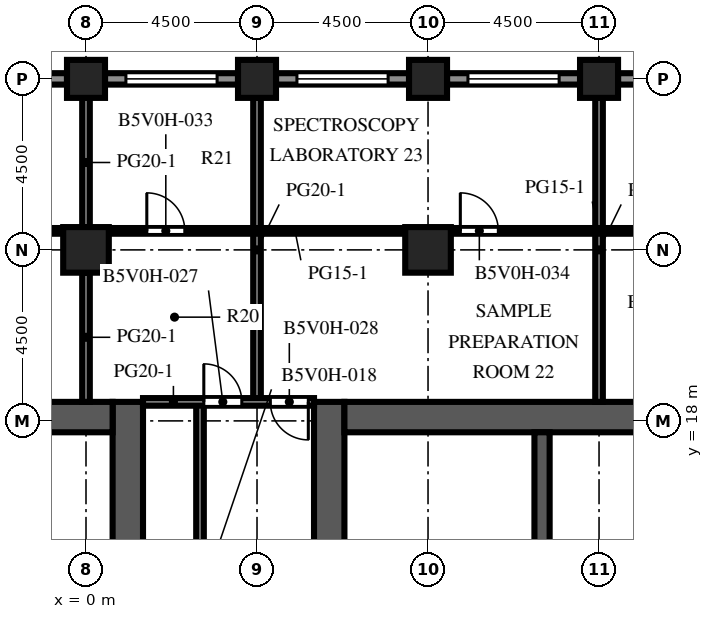
"""IFC4 building model, lengths in metres.
Left out: names, types, materials, properties, quantities, classifications, styles, units other than length and angle.
Written with IfcOpenShell. Run it as: python <this file> out.ifc"""

import sys

from ifc_helpers import new_model, si_unit, direction, frame, frame_2d, origin, origin_2d, place, context, subcontext, project, spatial, rectangle, extrude, element, fill, save


model = new_model("IFC4")
c1 = context("Model", 3, precision=1e-05, world=origin(), true_north=direction((0.0, 1.0)))
c2 = subcontext(c1, "Body", "Model", "MODEL_VIEW")
j1 = project(units=[si_unit("LENGTHUNIT", "METRE"), si_unit("PLANEANGLEUNIT", "RADIAN")], contexts=[c1])
p1 = place(None, origin())
s1 = spatial("IfcSite", under=j1, at=p1, CompositionType="ELEMENT")
p2 = place(p1, origin())
s2 = spatial("IfcBuilding", under=s1, at=p2, CompositionType="ELEMENT")
p3 = place(p2, frame((0.0, 0.0, 156.8)))
s3 = spatial("IfcBuildingStorey", under=s2, at=p3, CompositionType="ELEMENT", Elevation=156.8)
for number, where, z_axis, x_axis in (
    (1, (0.0, 27.0, 0.0), (0.0, 0.0, 1.0), (1.0, 0.0, 0.0)),
    (2, (4.5, 27.0, 0.0), (0.0, 0.0, 1.0), (1.0, 0.0, 0.0)),
    (3, (9.0, 27.0, 0.0), (0.0, 0.0, 1.0), (1.0, 0.0, 0.0)),
    (4, (13.5, 27.0, 0.0), (0.0, 0.0, 1.0), (1.0, 0.0, 0.0)),
):
    element("IfcColumn", number, at=place(p3, frame(where, z_axis=z_axis, x_axis=x_axis)), inside=s3, PredefinedType="COLUMN", context=c2, shape_type="SweptSolid", body=[
        extrude(rectangle(XDim=1.0, YDim=1.0, at=origin_2d()), origin(), (0.0, 0.0, 1.0), 4.1),
    ])
for number, where, z_axis, x_axis in (
    (5, (0.0, 22.5, 0.0), (0.0, 0.0, 1.0), (1.0, 0.0, 0.0)),
    (6, (9.0, 22.5, 0.0), (0.0, 0.0, 1.0), (1.0, 0.0, 0.0)),
):
    element("IfcColumn", number, at=place(p3, frame(where, z_axis=z_axis, x_axis=x_axis)), inside=s3, PredefinedType="COLUMN", context=c2, shape_type="SweptSolid", body=[
        extrude(rectangle(XDim=1.2, YDim=1.2, at=origin_2d()), origin(), (0.0, 0.0, 1.0), 4.1),
    ])
p4 = place(p3, frame((1.1, -9.0, 0.0), z_axis=(0.0, 0.0, 1.0), x_axis=(0.0, 1.0, 0.0)))
e7 = element("IfcWall", 7, at=p4, inside=s3, PredefinedType="SHEAR", context=c2, shape_type="SweptSolid", body=[
    extrude(rectangle(XDim=27.5, YDim=0.8, at=frame_2d((13.75, 0.0))), origin(), (0.0, 0.0, 1.0), 4.1),
])
p5 = place(p4, frame((12.55, 0.0, 0.0)))
e8 = element("IfcOpeningElement", 8, at=p5, cuts=e7, PredefinedType="OPENING", context=c2, shape_type="SweptSolid", body=[
    extrude(rectangle(XDim=2.4, YDim=2.4, at=frame_2d((1.2, 1.2))), frame((0.0, 0.41, 0.0), z_axis=(0.0, -1.0, 0.0), x_axis=(1.0, 0.0, 0.0)), (0.0, 0.0, 1.0), 0.82),
])
p6 = place(p4, frame((5.45, 0.0, 0.0)))
e9 = element("IfcOpeningElement", 9, at=p6, cuts=e7, PredefinedType="OPENING", context=c2, shape_type="SweptSolid", body=[
    extrude(rectangle(XDim=1.2, YDim=2.1, at=frame_2d((0.6, 1.05))), frame((0.0, 0.41, 0.0), z_axis=(0.0, -1.0, 0.0), x_axis=(1.0, 0.0, 0.0)), (0.0, 0.0, 1.0), 0.82),
])
p7 = place(p4, frame((19.45, 0.0, 0.0)))
e10 = element("IfcOpeningElement", 10, at=p7, cuts=e7, PredefinedType="OPENING", context=c2, shape_type="SweptSolid", body=[
    extrude(rectangle(XDim=1.0, YDim=2.1, at=frame_2d((0.5, 1.05))), frame((0.0, 0.41, 0.0), z_axis=(0.0, -1.0, 0.0), x_axis=(1.0, 0.0, 0.0)), (0.0, 0.0, 1.0), 0.82),
])
p8 = place(p4, frame((21.137, 0.0, 0.0)))
e11 = element("IfcOpeningElement", 11, at=p8, cuts=e7, PredefinedType="OPENING", context=c2, shape_type="SweptSolid", body=[
    extrude(rectangle(XDim=1.0, YDim=2.1, at=frame_2d((0.5, 1.05))), frame((0.0, 0.41, 0.0), z_axis=(0.0, -1.0, 0.0), x_axis=(1.0, 0.0, 0.0)), (0.0, 0.0, 1.0), 0.82),
])
p9 = place(p4, frame((23.2, 0.0, 0.0)))
e12 = element("IfcOpeningElement", 12, at=p9, cuts=e7, PredefinedType="OPENING", context=c2, shape_type="SweptSolid", body=[
    extrude(rectangle(XDim=1.0, YDim=2.1, at=frame_2d((0.5, 1.05))), frame((0.0, 0.41, 0.0), z_axis=(0.0, -1.0, 0.0), x_axis=(1.0, 0.0, 0.0)), (0.0, 0.0, 1.0), 0.82),
])
p10 = place(p4, frame((25.262, 0.0, 0.0)))
e13 = element("IfcOpeningElement", 13, at=p10, cuts=e7, PredefinedType="OPENING", context=c2, shape_type="SweptSolid", body=[
    extrude(rectangle(XDim=1.0, YDim=2.1, at=frame_2d((0.5, 1.05))), frame((0.0, 0.41, 0.0), z_axis=(0.0, -1.0, 0.0), x_axis=(1.0, 0.0, 0.0)), (0.0, 0.0, 1.0), 0.82),
])
p11 = place(p3, frame((-9.7, 18.1, 0.0), z_axis=(0.0, 0.0, 1.0), x_axis=(1.0, 0.0, 0.0)))
e14 = element("IfcWall", 14, at=p11, inside=s3, PredefinedType="SHEAR", context=c2, shape_type="SweptSolid", body=[
    extrude(rectangle(XDim=10.4, YDim=0.8, at=frame_2d((5.2, 0.0))), origin(), (0.0, 0.0, 1.0), 4.1),
])
p12 = place(p3, frame((6.4, -9.0, 0.0), z_axis=(0.0, 0.0, 1.0), x_axis=(0.0, 1.0, 0.0)))
e15 = element("IfcWall", 15, at=p12, inside=s3, PredefinedType="SHEAR", context=c2, shape_type="SweptSolid", body=[
    extrude(rectangle(XDim=27.5, YDim=0.8, at=frame_2d((13.75, 0.0))), origin(), (0.0, 0.0, 1.0), 4.1),
])
p13 = place(p12, frame((12.55, 0.0, 0.0)))
e16 = element("IfcOpeningElement", 16, at=p13, cuts=e15, PredefinedType="OPENING", context=c2, shape_type="SweptSolid", body=[
    extrude(rectangle(XDim=2.4, YDim=2.4, at=frame_2d((1.2, 1.2))), frame((0.0, 0.41, 0.0), z_axis=(0.0, -1.0, 0.0), x_axis=(1.0, 0.0, 0.0)), (0.0, 0.0, 1.0), 0.82),
])
p14 = place(p12, frame((5.45, 0.0, 0.0)))
e17 = element("IfcOpeningElement", 17, at=p14, cuts=e15, PredefinedType="OPENING", context=c2, shape_type="SweptSolid", body=[
    extrude(rectangle(XDim=1.2, YDim=2.1, at=frame_2d((0.6, 1.05))), frame((0.0, 0.41, 0.0), z_axis=(0.0, -1.0, 0.0), x_axis=(1.0, 0.0, 0.0)), (0.0, 0.0, 1.0), 0.82),
])
p15 = place(p12, frame((19.45, 0.0, 0.0)))
e18 = element("IfcOpeningElement", 18, at=p15, cuts=e15, PredefinedType="OPENING", context=c2, shape_type="SweptSolid", body=[
    extrude(rectangle(XDim=1.0, YDim=2.1, at=frame_2d((0.5, 1.05))), frame((0.0, 0.41, 0.0), z_axis=(0.0, -1.0, 0.0), x_axis=(1.0, 0.0, 0.0)), (0.0, 0.0, 1.0), 0.82),
])
p16 = place(p12, frame((21.137, 0.0, 0.0)))
e19 = element("IfcOpeningElement", 19, at=p16, cuts=e15, PredefinedType="OPENING", context=c2, shape_type="SweptSolid", body=[
    extrude(rectangle(XDim=1.0, YDim=2.1, at=frame_2d((0.5, 1.05))), frame((0.0, 0.41, 0.0), z_axis=(0.0, -1.0, 0.0), x_axis=(1.0, 0.0, 0.0)), (0.0, 0.0, 1.0), 0.82),
])
p17 = place(p12, frame((23.2, 0.0, 0.0)))
e20 = element("IfcOpeningElement", 20, at=p17, cuts=e15, PredefinedType="OPENING", context=c2, shape_type="SweptSolid", body=[
    extrude(rectangle(XDim=1.0, YDim=2.1, at=frame_2d((0.5, 1.05))), frame((0.0, 0.41, 0.0), z_axis=(0.0, -1.0, 0.0), x_axis=(1.0, 0.0, 0.0)), (0.0, 0.0, 1.0), 0.82),
])
p18 = place(p12, frame((25.262, 0.0, 0.0)))
e21 = element("IfcOpeningElement", 21, at=p18, cuts=e15, PredefinedType="OPENING", context=c2, shape_type="SweptSolid", body=[
    extrude(rectangle(XDim=1.0, YDim=2.1, at=frame_2d((0.5, 1.05))), frame((0.0, 0.41, 0.0), z_axis=(0.0, -1.0, 0.0), x_axis=(1.0, 0.0, 0.0)), (0.0, 0.0, 1.0), 0.82),
])
p19 = place(p3, frame((6.8, 18.1, 0.0), z_axis=(0.0, 0.0, 1.0), x_axis=(1.0, 0.0, 0.0)))
e22 = element("IfcWall", 22, at=p19, inside=s3, PredefinedType="SHEAR", context=c2, shape_type="SweptSolid", body=[
    extrude(rectangle(XDim=10.4, YDim=0.8, at=frame_2d((5.2, 0.0))), origin(), (0.0, 0.0, 1.0), 4.1),
])
p20 = place(p3, frame((12.0, 10.2, 0.0), z_axis=(0.0, 0.0, 1.0), x_axis=(0.0, 1.0, 0.0)))
e23 = element("IfcWall", 23, at=p20, inside=s3, PredefinedType="SHEAR", context=c2, shape_type="SweptSolid", body=[
    extrude(rectangle(XDim=7.5, YDim=0.4, at=frame_2d((3.75, 0.0))), origin(), (0.0, 0.0, 1.0), 4.1),
])
p21 = place(p3, frame((14.0, 27.0, 0.0), z_axis=(0.0, 0.0, 1.0), x_axis=(1.0, 0.0, 0.0)))
e24 = element("IfcWall", 24, at=p21, inside=s3, PredefinedType="SOLIDWALL", context=c2, shape_type="SweptSolid", body=[
    extrude(rectangle(XDim=3.5, YDim=0.3, at=frame_2d((1.75, 0.0))), origin(), (0.0, 0.0, 1.0), 2.85),
])
p22 = place(p21, frame((1.25, 0.0, 0.0)))
e25 = element("IfcOpeningElement", 25, at=p22, cuts=e24, PredefinedType="OPENING", context=c2, shape_type="SweptSolid", body=[
    extrude(rectangle(XDim=1.0, YDim=2.2, at=frame_2d((0.5, 1.1))), frame((0.0, 0.16, 0.0), z_axis=(0.0, -1.0, 0.0), x_axis=(1.0, 0.0, 0.0)), (0.0, 0.0, 1.0), 0.32),
])
p23 = place(p3, frame((9.5, 27.0, 0.0), z_axis=(0.0, 0.0, 1.0), x_axis=(1.0, 0.0, 0.0)))
e26 = element("IfcWall", 26, at=p23, inside=s3, PredefinedType="SOLIDWALL", context=c2, shape_type="SweptSolid", body=[
    extrude(rectangle(XDim=3.5, YDim=0.3, at=frame_2d((1.75, 0.0))), origin(), (0.0, 0.0, 1.0), 2.85),
])
p24 = place(p23, frame((0.55, 0.0, 0.8)))
e27 = element("IfcOpeningElement", 27, at=p24, cuts=e26, PredefinedType="OPENING", context=c2, shape_type="SweptSolid", body=[
    extrude(rectangle(XDim=2.4, YDim=1.7, at=frame_2d((1.2, 0.85))), frame((0.0, 0.16, 0.0), z_axis=(0.0, -1.0, 0.0), x_axis=(1.0, 0.0, 0.0)), (0.0, 0.0, 1.0), 0.32),
])
p25 = place(p3, frame((5.0, 27.0, 0.0), z_axis=(0.0, 0.0, 1.0), x_axis=(1.0, 0.0, 0.0)))
e28 = element("IfcWall", 28, at=p25, inside=s3, PredefinedType="SOLIDWALL", context=c2, shape_type="SweptSolid", body=[
    extrude(rectangle(XDim=3.5, YDim=0.3, at=frame_2d((1.75, 0.0))), origin(), (0.0, 0.0, 1.0), 2.85),
])
p26 = place(p25, frame((0.55, 0.0, 0.8)))
e29 = element("IfcOpeningElement", 29, at=p26, cuts=e28, PredefinedType="OPENING", context=c2, shape_type="SweptSolid", body=[
    extrude(rectangle(XDim=2.4, YDim=1.7, at=frame_2d((1.2, 0.85))), frame((0.0, 0.16, 0.0), z_axis=(0.0, -1.0, 0.0), x_axis=(1.0, 0.0, 0.0)), (0.0, 0.0, 1.0), 0.32),
])
p27 = place(p3, frame((0.5, 27.0, 0.0), z_axis=(0.0, 0.0, 1.0), x_axis=(1.0, 0.0, 0.0)))
e30 = element("IfcWall", 30, at=p27, inside=s3, PredefinedType="SOLIDWALL", context=c2, shape_type="SweptSolid", body=[
    extrude(rectangle(XDim=3.5, YDim=0.3, at=frame_2d((1.75, 0.0))), origin(), (0.0, 0.0, 1.0), 2.85),
])
p28 = place(p27, frame((0.55, 0.0, 0.8)))
e31 = element("IfcOpeningElement", 31, at=p28, cuts=e30, PredefinedType="OPENING", context=c2, shape_type="SweptSolid", body=[
    extrude(rectangle(XDim=2.4, YDim=1.7, at=frame_2d((1.2, 0.85))), frame((0.0, 0.16, 0.0), z_axis=(0.0, -1.0, 0.0), x_axis=(1.0, 0.0, 0.0)), (0.0, 0.0, 1.0), 0.32),
])
p29 = place(p3, frame((-4.0, 27.0, 0.0), z_axis=(0.0, 0.0, 1.0), x_axis=(1.0, 0.0, 0.0)))
e32 = element("IfcWall", 32, at=p29, inside=s3, PredefinedType="SOLIDWALL", context=c2, shape_type="SweptSolid", body=[
    extrude(rectangle(XDim=3.5, YDim=0.3, at=frame_2d((1.75, 0.0))), origin(), (0.0, 0.0, 1.0), 2.85),
])
p30 = place(p29, frame((0.55, 0.0, 0.8)))
e33 = element("IfcOpeningElement", 33, at=p30, cuts=e32, PredefinedType="OPENING", context=c2, shape_type="SweptSolid", body=[
    extrude(rectangle(XDim=2.4, YDim=1.7, at=frame_2d((1.2, 0.85))), frame((0.0, 0.16, 0.0), z_axis=(0.0, -1.0, 0.0), x_axis=(1.0, 0.0, 0.0)), (0.0, 0.0, 1.0), 0.32),
])
for number, where, z_axis, x_axis in (
    (34, (-4.3, 15.825, 0.0), (0.0, 0.0, 1.0), (1.0, 0.0, 0.0)),
    (35, (6.8, 15.825, 0.0), (0.0, 0.0, 1.0), (1.0, 0.0, 0.0)),
):
    element("IfcWall", number, at=place(p3, frame(where, z_axis=z_axis, x_axis=x_axis)), inside=s3, PredefinedType="PARTITIONING", context=c2, shape_type="SweptSolid", body=[
        extrude(rectangle(XDim=5.0, YDim=0.1, at=frame_2d((2.5, 0.0))), origin(), (0.0, 0.0, 1.0), 3.65),
    ])
for number, where, z_axis, x_axis in (
    (36, (0.0, 18.5, 0.0), (0.0, 0.0, 1.0), (0.0, 1.0, 0.0)),
    (37, (0.0, 23.1, 0.0), (0.0, 0.0, 1.0), (0.0, 1.0, 0.0)),
):
    element("IfcWall", number, at=place(p3, frame(where, z_axis=z_axis, x_axis=x_axis)), inside=s3, PredefinedType="PARTITIONING", context=c2, shape_type="SweptSolid", body=[
        extrude(rectangle(XDim=3.4, YDim=0.2, at=frame_2d((1.7, 0.0))), origin(), (0.0, 0.0, 1.0), 3.65),
    ])
p31 = place(p3, frame((3.0, 6.7, 0.0), z_axis=(0.0, 0.0, 1.0), x_axis=(0.0, 1.0, 0.0)))
e38 = element("IfcWall", 38, at=p31, inside=s3, PredefinedType="PARTITIONING", context=c2, shape_type="SweptSolid", body=[
    extrude(rectangle(XDim=11.8, YDim=0.2, at=frame_2d((5.9, 0.0))), origin(), (0.0, 0.0, 1.0), 3.65),
])
p32 = place(p31, frame((6.1, 0.0, 0.0)))
e39 = element("IfcOpeningElement", 39, at=p32, cuts=e38, PredefinedType="OPENING", context=c2, shape_type="SweptSolid", body=[
    extrude(rectangle(XDim=1.0, YDim=2.1, at=frame_2d((0.5, 1.05))), frame((0.0, 0.11, 0.0), z_axis=(0.0, -1.0, 0.0), x_axis=(1.0, 0.0, 0.0)), (0.0, 0.0, 1.0), 0.22),
])
for number, where, z_axis, x_axis in (
    (40, (4.5, 18.5, 0.0), (0.0, 0.0, 1.0), (0.0, 1.0, 0.0)),
    (41, (13.5, 18.5, 0.0), (0.0, 0.0, 1.0), (0.0, 1.0, 0.0)),
):
    element("IfcWall", number, at=place(p3, frame(where, z_axis=z_axis, x_axis=x_axis)), inside=s3, PredefinedType="PARTITIONING", context=c2, shape_type="SweptSolid", body=[
        extrude(rectangle(XDim=8.0, YDim=0.2, at=frame_2d((4.0, 0.0))), origin(), (0.0, 0.0, 1.0), 3.65),
    ])
p33 = place(p3, frame((1.5, 18.5, 0.0), z_axis=(0.0, 0.0, 1.0), x_axis=(1.0, 0.0, 0.0)))
e42 = element("IfcWall", 42, at=p33, inside=s3, PredefinedType="PARTITIONING", context=c2, shape_type="SweptSolid", body=[
    extrude(rectangle(XDim=4.5, YDim=0.2, at=frame_2d((2.25, 0.0))), origin(), (0.0, 0.0, 1.0), 3.65),
])
p34 = place(p33, frame((1.6, 0.0, 0.0)))
e43 = element("IfcOpeningElement", 43, at=p34, cuts=e42, PredefinedType="OPENING", context=c2, shape_type="SweptSolid", body=[
    extrude(rectangle(XDim=1.0, YDim=2.1, at=frame_2d((0.5, 1.05))), frame((0.0, 0.11, 0.0), z_axis=(0.0, -1.0, 0.0), x_axis=(1.0, 0.0, 0.0)), (0.0, 0.0, 1.0), 0.22),
])
p35 = place(p33, frame((3.35, 0.0, 0.0)))
e44 = element("IfcOpeningElement", 44, at=p35, cuts=e42, PredefinedType="OPENING", context=c2, shape_type="SweptSolid", body=[
    extrude(rectangle(XDim=1.0, YDim=2.1, at=frame_2d((0.5, 1.05))), frame((0.0, 0.11, 0.0), z_axis=(0.0, -1.0, 0.0), x_axis=(1.0, 0.0, 0.0)), (0.0, 0.0, 1.0), 0.22),
])
p36 = place(p3, frame((-8.4, 23.0, 0.0), z_axis=(0.0, 0.0, 1.0), x_axis=(1.0, 0.0, 0.0)))
e45 = element("IfcWall", 45, at=p36, inside=s3, PredefinedType="PARTITIONING", context=c2, shape_type="SweptSolid", body=[
    extrude(rectangle(XDim=7.8, YDim=0.15, at=frame_2d((3.9, 0.0))), origin(), (0.0, 0.0, 1.0), 3.65),
])
p37 = place(p36, frame((0.75, 0.0, 0.0)))
e46 = element("IfcOpeningElement", 46, at=p37, cuts=e45, PredefinedType="OPENING", context=c2, shape_type="SweptSolid", body=[
    extrude(rectangle(XDim=1.0, YDim=2.1, at=frame_2d((0.5, 1.05))), frame((0.0, 0.085, 0.0), z_axis=(0.0, -1.0, 0.0), x_axis=(1.0, 0.0, 0.0)), (0.0, 0.0, 1.0), 0.17),
])
p38 = place(p3, frame((0.6, 23.0, 0.0), z_axis=(0.0, 0.0, 1.0), x_axis=(1.0, 0.0, 0.0)))
e47 = element("IfcWall", 47, at=p38, inside=s3, PredefinedType="PARTITIONING", context=c2, shape_type="SweptSolid", body=[
    extrude(rectangle(XDim=7.8, YDim=0.15, at=frame_2d((3.9, 0.0))), origin(), (0.0, 0.0, 1.0), 3.65),
])
p39 = place(p38, frame((1.0, 0.0, 0.0)))
e48 = element("IfcOpeningElement", 48, at=p39, cuts=e47, PredefinedType="OPENING", context=c2, shape_type="SweptSolid", body=[
    extrude(rectangle(XDim=1.0, YDim=2.1, at=frame_2d((0.5, 1.05))), frame((0.0, 0.085, 0.0), z_axis=(0.0, -1.0, 0.0), x_axis=(1.0, 0.0, 0.0)), (0.0, 0.0, 1.0), 0.17),
])
p40 = place(p3, frame((9.6, 23.0, 0.0), z_axis=(0.0, 0.0, 1.0), x_axis=(1.0, 0.0, 0.0)))
e49 = element("IfcWall", 49, at=p40, inside=s3, PredefinedType="PARTITIONING", context=c2, shape_type="SweptSolid", body=[
    extrude(rectangle(XDim=7.8, YDim=0.15, at=frame_2d((3.9, 0.0))), origin(), (0.0, 0.0, 1.0), 3.65),
])
p41 = place(p40, frame((0.25, 0.0, 0.0)))
e50 = element("IfcOpeningElement", 50, at=p41, cuts=e49, PredefinedType="OPENING", context=c2, shape_type="SweptSolid", body=[
    extrude(rectangle(XDim=1.0, YDim=2.1, at=frame_2d((0.5, 1.05))), frame((0.0, 0.085, 0.0), z_axis=(0.0, -1.0, 0.0), x_axis=(1.0, 0.0, 0.0)), (0.0, 0.0, 1.0), 0.17),
])
p42 = place(p40, frame((6.5, 0.0, 0.0)))
e51 = element("IfcOpeningElement", 51, at=p42, cuts=e49, PredefinedType="OPENING", context=c2, shape_type="SweptSolid", body=[
    extrude(rectangle(XDim=1.0, YDim=2.1, at=frame_2d((0.5, 1.05))), frame((0.0, 0.085, 0.0), z_axis=(0.0, -1.0, 0.0), x_axis=(1.0, 0.0, 0.0)), (0.0, 0.0, 1.0), 0.17),
])
p43 = place(p24, origin())
e52 = element("IfcWindow", 52, at=p43, inside=s3, PartitioningType="SINGLE_PANEL", PredefinedType="WINDOW", context=c2, shape_type="SweptSolid", body=[
    extrude(rectangle(XDim=2.4, YDim=1.7, at=frame_2d((1.2, 0.85))), frame((0.0, 0.03, 0.0), z_axis=(0.0, -1.0, 0.0), x_axis=(1.0, 0.0, 0.0)), (0.0, 0.0, 1.0), 0.06),
])
fill(e27, e52)
p44 = place(p26, origin())
e53 = element("IfcWindow", 53, at=p44, inside=s3, PartitioningType="SINGLE_PANEL", PredefinedType="WINDOW", context=c2, shape_type="SweptSolid", body=[
    extrude(rectangle(XDim=2.4, YDim=1.7, at=frame_2d((1.2, 0.85))), frame((0.0, 0.03, 0.0), z_axis=(0.0, -1.0, 0.0), x_axis=(1.0, 0.0, 0.0)), (0.0, 0.0, 1.0), 0.06),
])
fill(e29, e53)
p45 = place(p28, origin())
e54 = element("IfcWindow", 54, at=p45, inside=s3, PartitioningType="SINGLE_PANEL", PredefinedType="WINDOW", context=c2, shape_type="SweptSolid", body=[
    extrude(rectangle(XDim=2.4, YDim=1.7, at=frame_2d((1.2, 0.85))), frame((0.0, 0.03, 0.0), z_axis=(0.0, -1.0, 0.0), x_axis=(1.0, 0.0, 0.0)), (0.0, 0.0, 1.0), 0.06),
])
fill(e31, e54)
p46 = place(p9, origin())
e55 = element("IfcDoor", 55, at=p46, inside=s3, OperationType="SINGLE_SWING_LEFT", PredefinedType="DOOR", context=c2, shape_type="SweptSolid", body=[
    extrude(rectangle(XDim=1.0, YDim=2.1, at=frame_2d((0.5, 1.05))), frame((0.0, 0.375, 0.0), z_axis=(0.0, -1.0, 0.0), x_axis=(1.0, 0.0, 0.0)), (0.0, 0.0, 1.0), 0.05),
])
fill(e12, e55)
p47 = place(p10, origin())
e56 = element("IfcDoor", 56, at=p47, inside=s3, OperationType="SINGLE_SWING_RIGHT", PredefinedType="DOOR", context=c2, shape_type="SweptSolid", body=[
    extrude(rectangle(XDim=1.0, YDim=2.1, at=frame_2d((0.5, 1.05))), frame((0.0, 0.375, 0.0), z_axis=(0.0, -1.0, 0.0), x_axis=(1.0, 0.0, 0.0)), (0.0, 0.0, 1.0), 0.05),
])
fill(e13, e56)
p48 = place(p17, origin())
e57 = element("IfcDoor", 57, at=p48, inside=s3, OperationType="SINGLE_SWING_RIGHT", PredefinedType="DOOR", context=c2, shape_type="SweptSolid", body=[
    extrude(rectangle(XDim=1.0, YDim=2.1, at=frame_2d((0.5, 1.05))), frame((0.0, -0.325, 0.0), z_axis=(0.0, -1.0, 0.0), x_axis=(1.0, 0.0, 0.0)), (0.0, 0.0, 1.0), 0.05),
])
fill(e20, e57)
p49 = place(p18, origin())
e58 = element("IfcDoor", 58, at=p49, inside=s3, OperationType="SINGLE_SWING_LEFT", PredefinedType="DOOR", context=c2, shape_type="SweptSolid", body=[
    extrude(rectangle(XDim=1.0, YDim=2.1, at=frame_2d((0.5, 1.05))), frame((0.0, -0.325, 0.0), z_axis=(0.0, -1.0, 0.0), x_axis=(1.0, 0.0, 0.0)), (0.0, 0.0, 1.0), 0.05),
])
fill(e21, e58)
p50 = place(p34, origin())
e59 = element("IfcDoor", 59, at=p50, inside=s3, OperationType="SINGLE_SWING_LEFT", PredefinedType="DOOR", context=c2, shape_type="SweptSolid", body=[
    extrude(rectangle(XDim=1.0, YDim=2.1, at=frame_2d((0.5, 1.05))), frame((0.0, 0.025, 0.0), z_axis=(0.0, -1.0, 0.0), x_axis=(1.0, 0.0, 0.0)), (0.0, 0.0, 1.0), 0.05),
])
fill(e43, e59)
p51 = place(p35, origin())
e60 = element("IfcDoor", 60, at=p51, inside=s3, OperationType="SINGLE_SWING_RIGHT", PredefinedType="DOOR", context=c2, shape_type="SweptSolid", body=[
    extrude(rectangle(XDim=1.0, YDim=2.1, at=frame_2d((0.5, 1.05))), frame((0.0, 0.025, 0.0), z_axis=(0.0, -1.0, 0.0), x_axis=(1.0, 0.0, 0.0)), (0.0, 0.0, 1.0), 0.05),
])
fill(e44, e60)
p52 = place(p39, origin())
e61 = element("IfcDoor", 61, at=p52, inside=s3, OperationType="SINGLE_SWING_LEFT", PredefinedType="DOOR", context=c2, shape_type="SweptSolid", body=[
    extrude(rectangle(XDim=1.0, YDim=2.1, at=frame_2d((0.5, 1.05))), frame((0.0, 0.025, 0.0), z_axis=(0.0, -1.0, 0.0), x_axis=(1.0, 0.0, 0.0)), (0.0, 0.0, 1.0), 0.05),
])
fill(e48, e61)
p53 = place(p41, origin())
e62 = element("IfcDoor", 62, at=p53, inside=s3, OperationType="SINGLE_SWING_LEFT", PredefinedType="DOOR", context=c2, shape_type="SweptSolid", body=[
    extrude(rectangle(XDim=1.0, YDim=2.1, at=frame_2d((0.5, 1.05))), frame((0.0, 0.025, 0.0), z_axis=(0.0, -1.0, 0.0), x_axis=(1.0, 0.0, 0.0)), (0.0, 0.0, 1.0), 0.05),
])
fill(e50, e62)
save(model, sys.argv[1])
